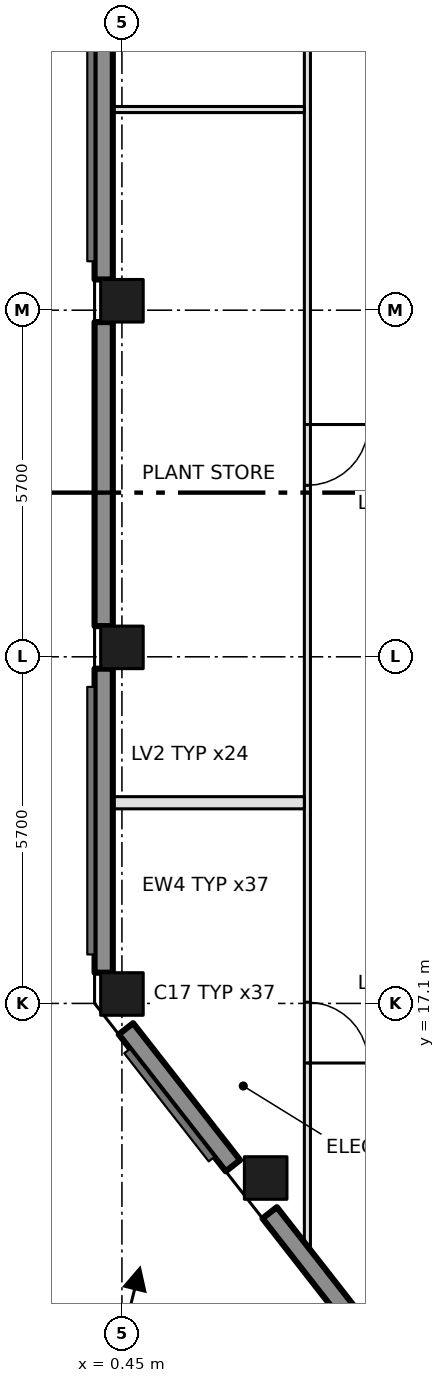
"""IFC4 building model, lengths in metres.
Left out: names, types, materials, properties, quantities, classifications, styles, units other than length and angle.
Written with IfcOpenShell. Run it as: python <this file> out.ifc"""

import sys

from ifc_helpers import new_model, si_unit, direction, frame, frame_2d, origin, origin_2d, place, context, subcontext, project, spatial, rectangle, extrude, element, fill, save


model = new_model("IFC4")
c1 = context("Model", 3, precision=1e-05, world=origin(), true_north=direction((0.0, 1.0)))
c2 = subcontext(c1, "Body", "Model", "MODEL_VIEW")
j1 = project(units=[si_unit("LENGTHUNIT", "METRE"), si_unit("PLANEANGLEUNIT", "RADIAN")], contexts=[c1])
p1 = place(None, origin())
s1 = spatial("IfcSite", under=j1, at=p1, CompositionType="ELEMENT")
p2 = place(p1, origin())
s2 = spatial("IfcBuilding", under=s1, at=p2, CompositionType="ELEMENT")
p3 = place(p2, frame((0.0, 0.0, 405.0)))
s3 = spatial("IfcBuildingStorey", under=s2, at=p3, CompositionType="ELEMENT", Elevation=405.0)
for number, where, z_axis, x_axis in (
    (1, (0.45, 17.255, 0.0), (0.0, 0.0, 1.0), (1.0, 0.0, 0.0)),
    (2, (0.45, 22.955, 0.0), (0.0, 0.0, 1.0), (1.0, 0.0, 0.0)),
    (3, (0.45, 28.655, 0.0), (0.0, 0.0, 1.0), (1.0, 0.0, 0.0)),
    (4, (2.814, 14.229, 0.0), (0.0, 0.0, 1.0), (1.0, 0.0, 0.0)),
):
    element("IfcColumn", number, at=place(p3, frame(where, z_axis=z_axis, x_axis=x_axis)), inside=s3, PredefinedType="COLUMN", context=c2, shape_type="SweptSolid", body=[
        extrude(rectangle(XDim=0.7, YDim=0.7, at=origin_2d()), origin(), (0.0, 0.0, 1.0), 4.8),
    ])
p4 = place(p3, frame((3.5, 43.2, 0.0), z_axis=(0.0, 0.0, 1.0), x_axis=(0.0, -1.0, 0.0)))
e5 = element("IfcWall", 5, at=p4, inside=s3, PredefinedType="PARTITIONING", context=c2, shape_type="SweptSolid", body=[
    extrude(rectangle(XDim=30.093, YDim=0.1, at=frame_2d((15.046, 0.0))), origin(), (0.0, 0.0, 1.0), 4.35),
])
p5 = place(p4, frame((26.08, 0.0, 0.0)))
e6 = element("IfcOpeningElement", 6, at=p5, cuts=e5, PredefinedType="OPENING", context=c2, shape_type="SweptSolid", body=[
    extrude(rectangle(XDim=1.0, YDim=2.1, at=frame_2d((0.5, 1.05))), frame((0.0, 0.06, 0.0), z_axis=(0.0, -1.0, 0.0), x_axis=(1.0, 0.0, 0.0)), (0.0, 0.0, 1.0), 0.12),
])
p6 = place(p4, frame((16.58, 0.0, 0.0)))
e7 = element("IfcOpeningElement", 7, at=p6, cuts=e5, PredefinedType="OPENING", context=c2, shape_type="SweptSolid", body=[
    extrude(rectangle(XDim=1.0, YDim=2.1, at=frame_2d((0.5, 1.05))), frame((0.0, 0.06, 0.0), z_axis=(0.0, -1.0, 0.0), x_axis=(1.0, 0.0, 0.0)), (0.0, 0.0, 1.0), 0.12),
])
p7 = place(p4, frame((5.18, 0.0, 0.0)))
e8 = element("IfcOpeningElement", 8, at=p7, cuts=e5, PredefinedType="OPENING", context=c2, shape_type="SweptSolid", body=[
    extrude(rectangle(XDim=1.0, YDim=2.1, at=frame_2d((0.5, 1.05))), frame((0.0, 0.06, 0.0), z_axis=(0.0, -1.0, 0.0), x_axis=(1.0, 0.0, 0.0)), (0.0, 0.0, 1.0), 0.12),
])
p8 = place(p3, frame((3.45, 20.4, 0.0), z_axis=(0.0, 0.0, 1.0), x_axis=(-1.0, 0.0, 0.0)))
e9 = element("IfcWall", 9, at=p8, inside=s3, PredefinedType="PARTITIONING", context=c2, shape_type="SweptSolid", body=[
    extrude(rectangle(XDim=3.15, YDim=0.2, at=frame_2d((1.575, 0.0))), origin(), (0.0, 0.0, 1.0), 4.35),
])
p9 = place(p3, frame((3.45, 31.8, 0.0), z_axis=(0.0, 0.0, 1.0), x_axis=(-1.0, 0.0, 0.0)))
e10 = element("IfcWall", 10, at=p9, inside=s3, PredefinedType="PARTITIONING", context=c2, shape_type="SweptSolid", body=[
    extrude(rectangle(XDim=3.15, YDim=0.1, at=frame_2d((1.575, 0.0))), origin(), (0.0, 0.0, 1.0), 4.35),
])
for number, where, z_axis, x_axis in (
    (11, (0.15, 34.005, 0.0), (0.0, 0.0, 1.0), (0.0, -1.0, 0.0)),
    (12, (0.15, 28.305, 0.0), (0.0, 0.0, 1.0), (0.0, -1.0, 0.0)),
    (13, (0.15, 22.605, 0.0), (0.0, 0.0, 1.0), (0.0, -1.0, 0.0)),
):
    element("IfcWall", number, at=place(p3, frame(where, z_axis=z_axis, x_axis=x_axis)), inside=s3, PredefinedType="SOLIDWALL", context=c2, shape_type="SweptSolid", body=[
        extrude(rectangle(XDim=5.0, YDim=0.3, at=frame_2d((2.5, 0.0))), origin(), (0.0, 0.0, 1.0), 3.7),
    ])
p10 = place(p3, frame((0.516, 16.683, 0.0), z_axis=(0.0, 0.0, 1.0), x_axis=(0.615483207854, -0.788149998953, 0.0)))
e14 = element("IfcWall", 14, at=p10, inside=s3, PredefinedType="SOLIDWALL", context=c2, shape_type="SweptSolid", body=[
    extrude(rectangle(XDim=2.858, YDim=0.3, at=frame_2d((1.429, 0.0))), origin(), (0.0, 0.0, 1.0), 3.7),
])
p11 = place(p3, frame((2.88, 13.657, 0.0), z_axis=(0.0, 0.0, 1.0), x_axis=(0.61578764214, -0.787912165021, 0.0)))
e15 = element("IfcWall", 15, at=p11, inside=s3, PredefinedType="SOLIDWALL", context=c2, shape_type="SweptSolid", body=[
    extrude(rectangle(XDim=4.718, YDim=0.3, at=frame_2d((2.359, 0.0))), origin(), (0.0, 0.0, 1.0), 3.7),
])
p12 = place(p5, origin())
e16 = element("IfcDoor", 16, at=p12, inside=s3, OperationType="SINGLE_SWING_RIGHT", PredefinedType="DOOR", context=c2, shape_type="SweptSolid", body=[
    extrude(rectangle(XDim=1.0, YDim=2.1, at=frame_2d((0.5, 1.05))), frame((0.0, 0.025, 0.0), z_axis=(0.0, -1.0, 0.0), x_axis=(1.0, 0.0, 0.0)), (0.0, 0.0, 1.0), 0.05),
])
fill(e6, e16)
p13 = place(p6, origin())
e17 = element("IfcDoor", 17, at=p13, inside=s3, OperationType="SINGLE_SWING_LEFT", PredefinedType="DOOR", context=c2, shape_type="SweptSolid", body=[
    extrude(rectangle(XDim=1.0, YDim=2.1, at=frame_2d((0.5, 1.05))), frame((0.0, 0.025, 0.0), z_axis=(0.0, -1.0, 0.0), x_axis=(1.0, 0.0, 0.0)), (0.0, 0.0, 1.0), 0.05),
])
fill(e7, e17)
save(model, sys.argv[1])
